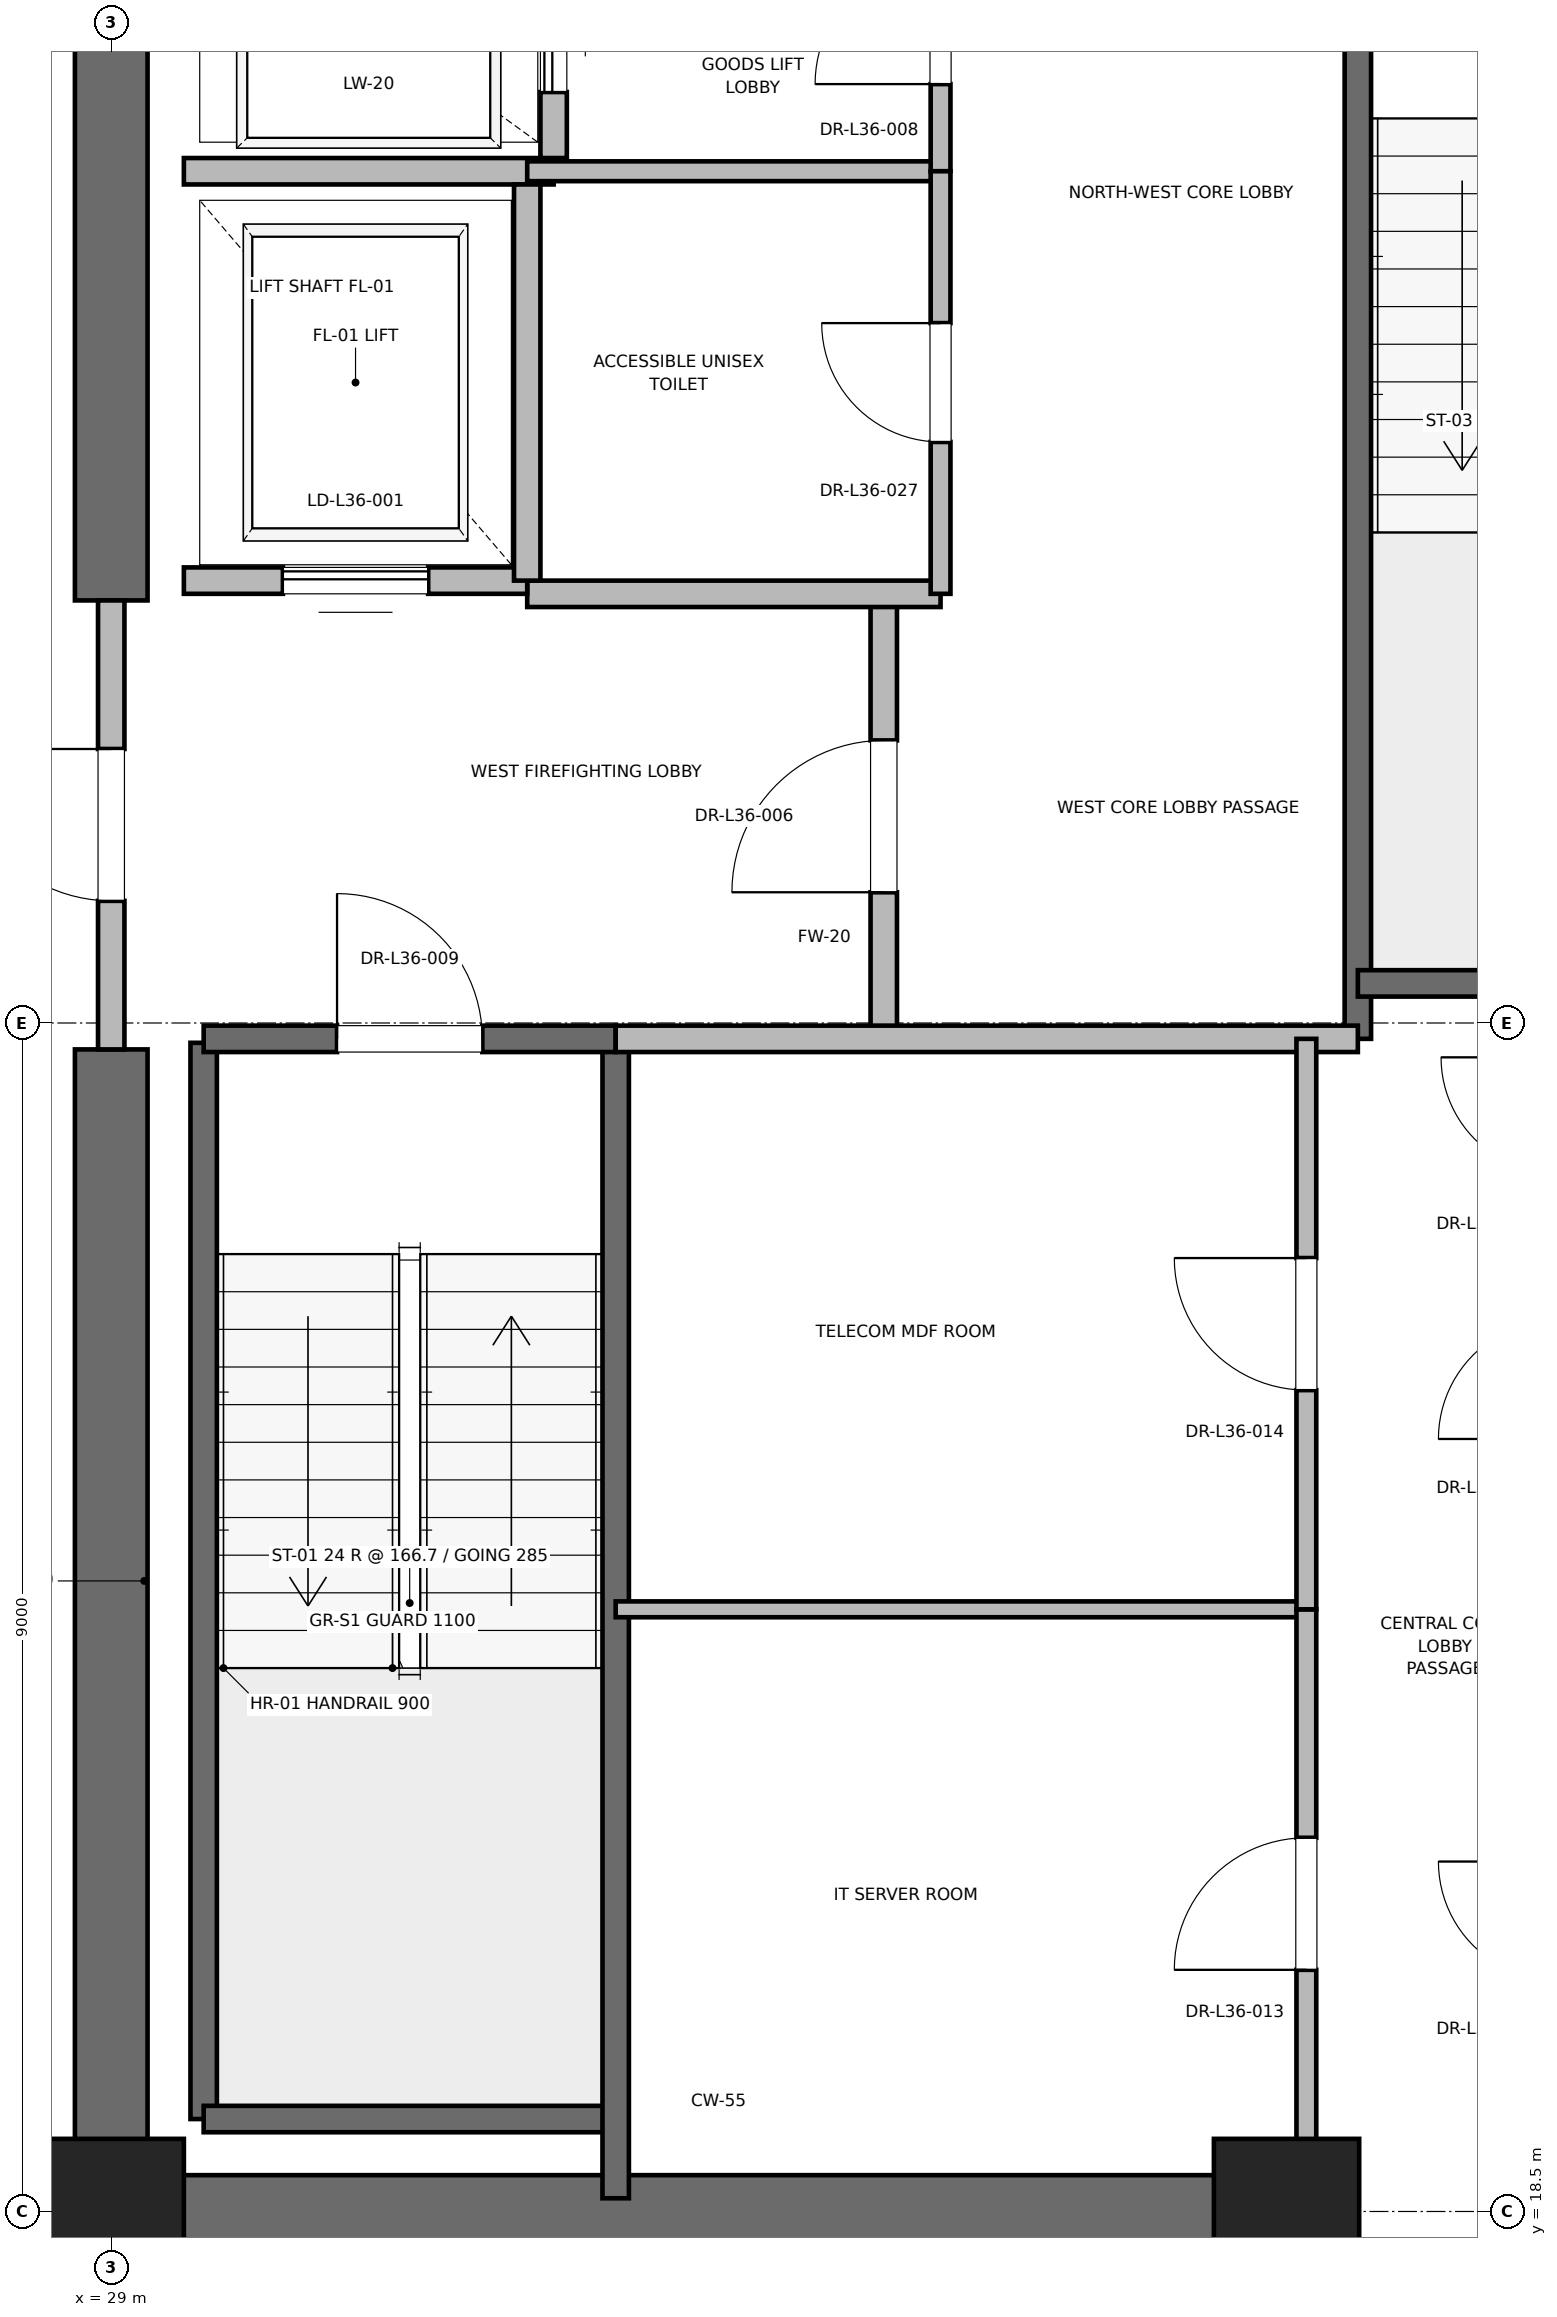
"""IFC4 building model, lengths in metres.
Left out: names, types, materials, properties, quantities, classifications, styles, units other than length and angle.
Written with IfcOpenShell. Run it as: python <this file> out.ifc"""

import sys

from ifc_helpers import new_model, si_unit, direction, frame, frame_2d, origin, origin_2d, place, context, subcontext, project, spatial, rectangle, extrude, element, fill, save


model = new_model("IFC4")
c1 = context("Model", 3, precision=1e-05, world=origin(), true_north=direction((0.0, 1.0)))
c2 = subcontext(c1, "Body", "Model", "MODEL_VIEW")
j1 = project(units=[si_unit("LENGTHUNIT", "METRE"), si_unit("PLANEANGLEUNIT", "RADIAN")], contexts=[c1])
p1 = place(None, origin())
s1 = spatial("IfcSite", under=j1, at=p1, CompositionType="ELEMENT")
p2 = place(p1, origin())
s2 = spatial("IfcBuilding", under=s1, at=p2, CompositionType="ELEMENT")
p3 = place(p2, frame((0.0, 0.0, 156.4)))
s3 = spatial("IfcBuildingStorey", under=s2, at=p3, CompositionType="ELEMENT", Elevation=156.4)
for number, where, z_axis, x_axis in (
    (1, (29.0, 18.5, 0.0), (0.0, 0.0, 1.0), (1.0, 0.0, 0.0)),
    (2, (37.9, 18.5, 0.0), (0.0, 0.0, 1.0), (1.0, 0.0, 0.0)),
):
    element("IfcColumn", number, at=place(p3, frame(where, z_axis=z_axis, x_axis=x_axis)), inside=s3, PredefinedType="PILASTER", context=c2, shape_type="SweptSolid", body=[
        extrude(rectangle(XDim=1.1, YDim=1.1, at=origin_2d()), origin(), (0.0, 0.0, 1.0), 4.0),
    ])
p4 = place(p3, frame((29.0, 18.5, 0.0), z_axis=(0.0, 0.0, 1.0), x_axis=(1.0, 0.0, 0.0)))
e3 = element("IfcWall", 3, at=p4, inside=s3, PredefinedType="SHEAR", context=c2, shape_type="SweptSolid", body=[
    extrude(rectangle(XDim=9.2, YDim=0.55, at=frame_2d((4.6, 0.0))), origin(), (0.0, 0.0, 1.0), 3.775),
])
p5 = place(p3, frame((29.0, 18.5, 0.0), z_axis=(0.0, 0.0, 1.0), x_axis=(0.0, 1.0, 0.0)))
e4 = element("IfcWall", 4, at=p5, inside=s3, PredefinedType="SHEAR", context=c2, shape_type="SweptSolid", body=[
    extrude(rectangle(XDim=8.8, YDim=0.55, at=frame_2d((4.4, 0.0))), origin(), (0.0, 0.0, 1.0), 3.775),
])
p6 = place(p3, frame((29.0, 30.7, 0.0), z_axis=(0.0, 0.0, 1.0), x_axis=(0.0, 1.0, 0.0)))
e5 = element("IfcWall", 5, at=p6, inside=s3, PredefinedType="SHEAR", context=c2, shape_type="SweptSolid", body=[
    extrude(rectangle(XDim=5.8, YDim=0.55, at=frame_2d((2.9, 0.0))), origin(), (0.0, 0.0, 1.0), 3.775),
])
p7 = place(p3, frame((29.7, 19.2, 0.0), z_axis=(0.0, 0.0, 1.0), x_axis=(0.0, 1.0, 0.0)))
e6 = element("IfcWall", 6, at=p7, inside=s3, PredefinedType="SOLIDWALL", context=c2, shape_type="SweptSolid", body=[
    extrude(rectangle(XDim=8.15, YDim=0.2, at=frame_2d((4.075, 0.0))), origin(), (0.0, 0.0, 1.0), 3.775),
])
p8 = place(p3, frame((29.7, 19.2, 0.0), z_axis=(0.0, 0.0, 1.0), x_axis=(1.0, 0.0, 0.0)))
e7 = element("IfcWall", 7, at=p8, inside=s3, PredefinedType="SOLIDWALL", context=c2, shape_type="SweptSolid", body=[
    extrude(rectangle(XDim=3.12, YDim=0.2, at=frame_2d((1.56, 0.0))), origin(), (0.0, 0.0, 1.0), 3.775),
])
p9 = place(p3, frame((32.82, 18.6, 0.0), z_axis=(0.0, 0.0, 1.0), x_axis=(0.0, 1.0, 0.0)))
e8 = element("IfcWall", 8, at=p9, inside=s3, PredefinedType="SOLIDWALL", context=c2, shape_type="SweptSolid", body=[
    extrude(rectangle(XDim=8.78, YDim=0.2, at=frame_2d((4.39, 0.0))), origin(), (0.0, 0.0, 1.0), 3.775),
])
p10 = place(p3, frame((29.7, 27.38, 0.0), z_axis=(0.0, 0.0, 1.0), x_axis=(1.0, 0.0, 0.0)))
e9 = element("IfcWall", 9, at=p10, inside=s3, PredefinedType="SOLIDWALL", context=c2, shape_type="SweptSolid", body=[
    extrude(rectangle(XDim=3.12, YDim=0.2, at=frame_2d((1.56, 0.0))), origin(), (0.0, 0.0, 1.0), 3.775),
])
p11 = place(p10, frame((1.01, 0.0, 0.0)))
e10 = element("IfcOpeningElement", 10, at=p11, cuts=e9, PredefinedType="OPENING", context=c2, shape_type="SweptSolid", body=[
    extrude(rectangle(XDim=1.1, YDim=2.15, at=frame_2d((0.55, 1.075))), frame((0.0, 0.1, 0.0), z_axis=(0.0, -1.0, 0.0), x_axis=(1.0, 0.0, 0.0)), (0.0, 0.0, 1.0), 0.2),
])
p12 = place(p3, frame((38.44, 27.38, 0.0), z_axis=(0.0, 0.0, 1.0), x_axis=(0.0, 1.0, 0.0)))
e11 = element("IfcWall", 11, at=p12, inside=s3, PredefinedType="SOLIDWALL", context=c2, shape_type="SweptSolid", body=[
    extrude(rectangle(XDim=8.87, YDim=0.2, at=frame_2d((4.435, 0.0))), origin(), (0.0, 0.0, 1.0), 3.775),
])
p13 = place(p3, frame((38.44, 27.8, 0.0), z_axis=(0.0, 0.0, 1.0), x_axis=(1.0, 0.0, 0.0)))
e12 = element("IfcWall", 12, at=p13, inside=s3, PredefinedType="SOLIDWALL", context=c2, shape_type="SweptSolid", body=[
    extrude(rectangle(XDim=3.32, YDim=0.2, at=frame_2d((1.66, 0.0))), origin(), (0.0, 0.0, 1.0), 3.775),
])
p14 = place(p3, frame((34.85, 27.38, 0.0), z_axis=(0.0, 0.0, 1.0), x_axis=(0.0, 1.0, 0.0)))
e13 = element("IfcWall", 13, at=p14, inside=s3, PredefinedType="PARTITIONING", context=c2, shape_type="SweptSolid", body=[
    extrude(rectangle(XDim=3.37, YDim=0.2, at=frame_2d((1.685, 0.0))), origin(), (0.0, 0.0, 1.0), 3.775),
])
p15 = place(p14, frame((1.11, 0.0, 0.0)))
e14 = element("IfcOpeningElement", 14, at=p15, cuts=e13, PredefinedType="OPENING", context=c2, shape_type="SweptSolid", body=[
    extrude(rectangle(XDim=1.15, YDim=2.2, at=frame_2d((0.575, 1.1))), frame((0.0, 0.1, 0.0), z_axis=(0.0, -1.0, 0.0), x_axis=(1.0, 0.0, 0.0)), (0.0, 0.0, 1.0), 0.2),
])
p16 = place(p3, frame((29.0, 27.3, 0.0), z_axis=(0.0, 0.0, 1.0), x_axis=(0.0, 1.0, 0.0)))
e15 = element("IfcWall", 15, at=p16, inside=s3, PredefinedType="PARTITIONING", context=c2, shape_type="SweptSolid", body=[
    extrude(rectangle(XDim=3.4, YDim=0.2, at=frame_2d((1.7, 0.0))), origin(), (0.0, 0.0, 1.0), 2.755),
])
p17 = place(p16, frame((1.125, 0.0, 0.0)))
e16 = element("IfcOpeningElement", 16, at=p17, cuts=e15, PredefinedType="OPENING", context=c2, shape_type="SweptSolid", body=[
    extrude(rectangle(XDim=1.15, YDim=2.2, at=frame_2d((0.575, 1.1))), frame((0.0, 0.1, 0.0), z_axis=(0.0, -1.0, 0.0), x_axis=(1.0, 0.0, 0.0)), (0.0, 0.0, 1.0), 0.2),
])
p18 = place(p3, frame((32.82, 27.38, 0.0), z_axis=(0.0, 0.0, 1.0), x_axis=(1.0, 0.0, 0.0)))
e17 = element("IfcWall", 17, at=p18, inside=s3, PredefinedType="PARTITIONING", context=c2, shape_type="SweptSolid", body=[
    extrude(rectangle(XDim=5.62, YDim=0.2, at=frame_2d((2.81, 0.0))), origin(), (0.0, 0.0, 1.0), 3.775),
])
p19 = place(p3, frame((32.15, 30.75, 0.0), z_axis=(0.0, 0.0, 1.0), x_axis=(1.0, 0.0, 0.0)))
e18 = element("IfcWall", 18, at=p19, inside=s3, PredefinedType="PARTITIONING", context=c2, shape_type="SweptSolid", body=[
    extrude(rectangle(XDim=3.13, YDim=0.2, at=frame_2d((1.565, 0.0))), origin(), (0.0, 0.0, 1.0), 3.775),
])
p20 = place(p3, frame((29.55, 30.85, 0.0), z_axis=(0.0, 0.0, 1.0), x_axis=(1.0, 0.0, 0.0)))
e19 = element("IfcWall", 19, at=p20, inside=s3, PredefinedType="SOLIDWALL", context=c2, shape_type="SweptSolid", body=[
    extrude(rectangle(XDim=2.6, YDim=0.2, at=frame_2d((1.3, 0.0))), origin(), (0.0, 0.0, 1.0), 2.755),
])
p21 = place(p20, frame((0.75, 0.0, 0.0)))
e20 = element("IfcOpeningElement", 20, at=p21, cuts=e19, PredefinedType="OPENING", context=c2, shape_type="SweptSolid", body=[
    extrude(rectangle(XDim=1.1, YDim=2.2, at=frame_2d((0.55, 1.1))), frame((0.0, 0.1, 0.0), z_axis=(0.0, -1.0, 0.0), x_axis=(1.0, 0.0, 0.0)), (0.0, 0.0, 1.0), 0.2),
])
p22 = place(p3, frame((29.55, 33.95, 0.0), z_axis=(0.0, 0.0, 1.0), x_axis=(1.0, 0.0, 0.0)))
e21 = element("IfcWall", 21, at=p22, inside=s3, PredefinedType="SOLIDWALL", context=c2, shape_type="SweptSolid", body=[
    extrude(rectangle(XDim=2.8, YDim=0.2, at=frame_2d((1.4, 0.0))), origin(), (0.0, 0.0, 1.0), 3.775),
])
p23 = place(p3, frame((32.15, 30.85, 0.0), z_axis=(0.0, 0.0, 1.0), x_axis=(0.0, 1.0, 0.0)))
e22 = element("IfcWall", 22, at=p23, inside=s3, PredefinedType="SOLIDWALL", context=c2, shape_type="SweptSolid", body=[
    extrude(rectangle(XDim=3.0, YDim=0.2, at=frame_2d((1.5, 0.0))), origin(), (0.0, 0.0, 1.0), 3.775),
])
p24 = place(p3, frame((32.35, 34.05, 0.0), z_axis=(0.0, 0.0, 1.0), x_axis=(0.0, 1.0, 0.0)))
e23 = element("IfcWall", 23, at=p24, inside=s3, PredefinedType="SOLIDWALL", context=c2, shape_type="SweptSolid", body=[
    extrude(rectangle(XDim=2.1, YDim=0.2, at=frame_2d((1.05, 0.0))), origin(), (0.0, 0.0, 1.0), 3.775),
])
p25 = place(p24, frame((0.5, 0.0, 0.0)))
e24 = element("IfcOpeningElement", 24, at=p25, cuts=e23, PredefinedType="OPENING", context=c2, shape_type="SweptSolid", body=[
    extrude(rectangle(XDim=1.1, YDim=2.2, at=frame_2d((0.55, 1.1))), frame((0.0, 0.1, 0.0), z_axis=(0.0, -1.0, 0.0), x_axis=(1.0, 0.0, 0.0)), (0.0, 0.0, 1.0), 0.2),
])
p26 = place(p3, frame((32.15, 33.95, 0.0), z_axis=(0.0, 0.0, 1.0), x_axis=(1.0, 0.0, 0.0)))
e25 = element("IfcWall", 25, at=p26, inside=s3, PredefinedType="PARTITIONING", context=c2, shape_type="SweptSolid", body=[
    extrude(rectangle(XDim=3.13, YDim=0.15, at=frame_2d((1.565, 0.0))), origin(), (0.0, 0.0, 1.0), 2.85),
])
p27 = place(p3, frame((35.28, 33.95, 0.0), z_axis=(0.0, 0.0, 1.0), x_axis=(0.0, 1.0, 0.0)))
e26 = element("IfcWall", 26, at=p27, inside=s3, PredefinedType="PARTITIONING", context=c2, shape_type="SweptSolid", body=[
    extrude(rectangle(XDim=2.27, YDim=0.15, at=frame_2d((1.135, 0.0))), origin(), (0.0, 0.0, 1.0), 2.755),
])
p28 = place(p27, frame((0.66, 0.0, 0.0)))
e27 = element("IfcOpeningElement", 27, at=p28, cuts=e26, PredefinedType="OPENING", context=c2, shape_type="SweptSolid", body=[
    extrude(rectangle(XDim=0.95, YDim=2.15, at=frame_2d((0.475, 1.075))), frame((0.0, 0.075, 0.0), z_axis=(0.0, -1.0, 0.0), x_axis=(1.0, 0.0, 0.0)), (0.0, 0.0, 1.0), 0.15),
])
p29 = place(p3, frame((35.28, 30.75, 0.0), z_axis=(0.0, 0.0, 1.0), x_axis=(0.0, 1.0, 0.0)))
e28 = element("IfcWall", 28, at=p29, inside=s3, PredefinedType="PARTITIONING", context=c2, shape_type="SweptSolid", body=[
    extrude(rectangle(XDim=3.2, YDim=0.15, at=frame_2d((1.6, 0.0))), origin(), (0.0, 0.0, 1.0), 2.85),
])
p30 = place(p29, frame((1.15, 0.0, 0.0)))
e29 = element("IfcOpeningElement", 29, at=p30, cuts=e28, PredefinedType="OPENING", context=c2, shape_type="SweptSolid", body=[
    extrude(rectangle(XDim=0.9, YDim=2.1, at=frame_2d((0.45, 1.05))), frame((0.0, 0.075, 0.0), z_axis=(0.0, -1.0, 0.0), x_axis=(1.0, 0.0, 0.0)), (0.0, 0.0, 1.0), 0.15),
])
p31 = place(p3, frame((32.82, 23.06, 0.0), z_axis=(0.0, 0.0, 1.0), x_axis=(1.0, 0.0, 0.0)))
e30 = element("IfcWall", 30, at=p31, inside=s3, PredefinedType="PARTITIONING", context=c2, shape_type="SweptSolid", body=[
    extrude(rectangle(XDim=5.23, YDim=0.12, at=frame_2d((2.615, 0.0))), origin(), (0.0, 0.0, 1.0), 2.85),
])
p32 = place(p3, frame((38.05, 18.6, 0.0), z_axis=(0.0, 0.0, 1.0), x_axis=(0.0, 1.0, 0.0)))
e31 = element("IfcWall", 31, at=p32, inside=s3, PredefinedType="PARTITIONING", context=c2, shape_type="SweptSolid", body=[
    extrude(rectangle(XDim=4.46, YDim=0.15, at=frame_2d((2.23, 0.0))), origin(), (0.0, 0.0, 1.0), 2.755),
])
p33 = place(p32, frame((1.73, 0.0, 0.0)))
e32 = element("IfcOpeningElement", 32, at=p33, cuts=e31, PredefinedType="OPENING", context=c2, shape_type="SweptSolid", body=[
    extrude(rectangle(XDim=1.0, YDim=2.15, at=frame_2d((0.5, 1.075))), frame((0.0, 0.075, 0.0), z_axis=(0.0, -1.0, 0.0), x_axis=(1.0, 0.0, 0.0)), (0.0, 0.0, 1.0), 0.15),
])
p34 = place(p3, frame((38.05, 23.06, 0.0), z_axis=(0.0, 0.0, 1.0), x_axis=(0.0, 1.0, 0.0)))
e33 = element("IfcWall", 33, at=p34, inside=s3, PredefinedType="PARTITIONING", context=c2, shape_type="SweptSolid", body=[
    extrude(rectangle(XDim=4.32, YDim=0.15, at=frame_2d((2.16, 0.0))), origin(), (0.0, 0.0, 1.0), 2.85),
])
p35 = place(p34, frame((1.66, 0.0, 0.0)))
e34 = element("IfcOpeningElement", 34, at=p35, cuts=e33, PredefinedType="OPENING", context=c2, shape_type="SweptSolid", body=[
    extrude(rectangle(XDim=1.0, YDim=2.15, at=frame_2d((0.5, 1.075))), frame((0.0, 0.075, 0.0), z_axis=(0.0, -1.0, 0.0), x_axis=(1.0, 0.0, 0.0)), (0.0, 0.0, 1.0), 0.15),
])
p36 = place(p11, origin())
e35 = element("IfcDoor", 35, at=p36, inside=s3, OperationType="SINGLE_SWING_LEFT", PredefinedType="DOOR", context=c2, shape_type="SweptSolid", body=[
    extrude(rectangle(XDim=1.1, YDim=2.15, at=frame_2d((0.55, 1.075))), frame((0.0, 0.025, 0.0), z_axis=(0.0, -1.0, 0.0), x_axis=(1.0, 0.0, 0.0)), (0.0, 0.0, 1.0), 0.05),
])
fill(e10, e35)
p37 = place(p15, origin())
e36 = element("IfcDoor", 36, at=p37, inside=s3, OperationType="SINGLE_SWING_LEFT", PredefinedType="DOOR", context=c2, shape_type="SweptSolid", body=[
    extrude(rectangle(XDim=1.15, YDim=2.2, at=frame_2d((0.575, 1.1))), frame((0.0, 0.025, 0.0), z_axis=(0.0, -1.0, 0.0), x_axis=(1.0, 0.0, 0.0)), (0.0, 0.0, 1.0), 0.05),
])
fill(e14, e36)
p38 = place(p17, origin())
e37 = element("IfcDoor", 37, at=p38, inside=s3, OperationType="SINGLE_SWING_RIGHT", PredefinedType="DOOR", context=c2, shape_type="SweptSolid", body=[
    extrude(rectangle(XDim=1.15, YDim=2.2, at=frame_2d((0.575, 1.1))), frame((0.0, 0.025, 0.0), z_axis=(0.0, -1.0, 0.0), x_axis=(1.0, 0.0, 0.0)), (0.0, 0.0, 1.0), 0.05),
])
fill(e16, e37)
p39 = place(p21, origin())
e38 = element("IfcDoor", 38, at=p39, inside=s3, OperationType="SLIDING_TO_RIGHT", PredefinedType="DOOR", context=c2, shape_type="SweptSolid", body=[
    extrude(rectangle(XDim=1.1, YDim=2.2, at=frame_2d((0.55, 1.1))), frame((0.0, 0.025, 0.0), z_axis=(0.0, -1.0, 0.0), x_axis=(1.0, 0.0, 0.0)), (0.0, 0.0, 1.0), 0.05),
])
fill(e20, e38)
p40 = place(p25, origin())
e39 = element("IfcDoor", 39, at=p40, inside=s3, OperationType="SLIDING_TO_RIGHT", PredefinedType="DOOR", context=c2, shape_type="SweptSolid", body=[
    extrude(rectangle(XDim=1.1, YDim=2.2, at=frame_2d((0.55, 1.1))), frame((0.0, 0.025, 0.0), z_axis=(0.0, -1.0, 0.0), x_axis=(1.0, 0.0, 0.0)), (0.0, 0.0, 1.0), 0.05),
])
fill(e24, e39)
p41 = place(p28, origin())
e40 = element("IfcDoor", 40, at=p41, inside=s3, OperationType="SINGLE_SWING_LEFT", PredefinedType="DOOR", context=c2, shape_type="SweptSolid", body=[
    extrude(rectangle(XDim=0.95, YDim=2.15, at=frame_2d((0.475, 1.075))), frame((0.0, 0.025, 0.0), z_axis=(0.0, -1.0, 0.0), x_axis=(1.0, 0.0, 0.0)), (0.0, 0.0, 1.0), 0.05),
])
fill(e27, e40)
p42 = place(p30, origin())
e41 = element("IfcDoor", 41, at=p42, inside=s3, OperationType="SINGLE_SWING_RIGHT", PredefinedType="DOOR", context=c2, shape_type="SweptSolid", body=[
    extrude(rectangle(XDim=0.9, YDim=2.1, at=frame_2d((0.45, 1.05))), frame((0.0, 0.025, 0.0), z_axis=(0.0, -1.0, 0.0), x_axis=(1.0, 0.0, 0.0)), (0.0, 0.0, 1.0), 0.05),
])
fill(e29, e41)
p43 = place(p33, origin())
e42 = element("IfcDoor", 42, at=p43, inside=s3, OperationType="SINGLE_SWING_LEFT", PredefinedType="DOOR", context=c2, shape_type="SweptSolid", body=[
    extrude(rectangle(XDim=1.0, YDim=2.15, at=frame_2d((0.5, 1.075))), frame((0.0, 0.025, 0.0), z_axis=(0.0, -1.0, 0.0), x_axis=(1.0, 0.0, 0.0)), (0.0, 0.0, 1.0), 0.05),
])
fill(e32, e42)
p44 = place(p35, origin())
e43 = element("IfcDoor", 43, at=p44, inside=s3, OperationType="SINGLE_SWING_RIGHT", PredefinedType="DOOR", context=c2, shape_type="SweptSolid", body=[
    extrude(rectangle(XDim=1.0, YDim=2.15, at=frame_2d((0.5, 1.075))), frame((0.0, 0.025, 0.0), z_axis=(0.0, -1.0, 0.0), x_axis=(1.0, 0.0, 0.0)), (0.0, 0.0, 1.0), 0.05),
])
fill(e34, e43)
save(model, sys.argv[1])
